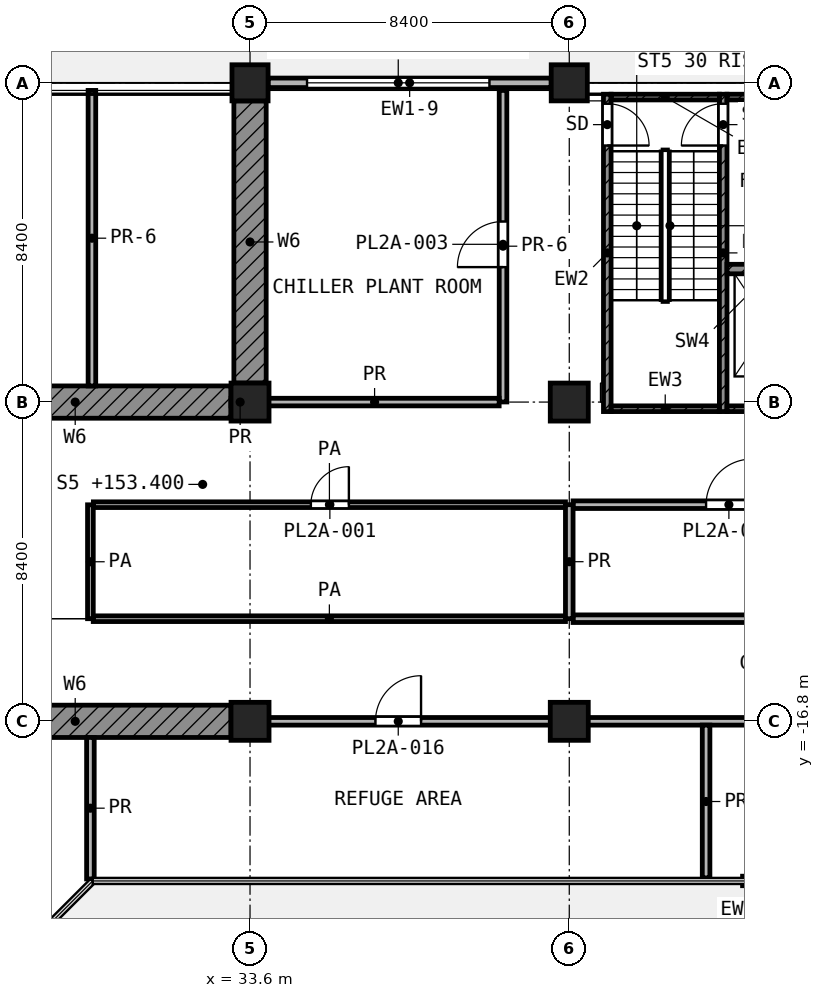
"""IFC4 building model, lengths in metres.
Left out: names, types, materials, properties, quantities, classifications, styles, units other than length and angle.
Written with IfcOpenShell. Run it as: python <this file> out.ifc"""

import sys

from ifc_helpers import new_model, si_unit, direction, frame, frame_2d, origin, origin_2d, place, context, subcontext, project, spatial, rectangle, extrude, element, fill, save


model = new_model("IFC4")
c1 = context("Model", 3, precision=1e-05, world=origin(), true_north=direction((0.0, 1.0)))
c2 = subcontext(c1, "Body", "Model", "MODEL_VIEW")
j1 = project(units=[si_unit("LENGTHUNIT", "METRE"), si_unit("PLANEANGLEUNIT", "RADIAN")], contexts=[c1])
p1 = place(None, origin())
s1 = spatial("IfcSite", under=j1, at=p1, CompositionType="ELEMENT")
p2 = place(p1, origin())
s2 = spatial("IfcBuilding", under=s1, at=p2, CompositionType="ELEMENT")
p3 = place(p2, frame((0.0, 0.0, 153.4)))
s3 = spatial("IfcBuildingStorey", under=s2, at=p3, CompositionType="ELEMENT", Elevation=153.4)
for number, where, z_axis, x_axis in (
    (1, (33.6, 0.0, 0.0), (0.0, 0.0, 1.0), (1.0, 0.0, 0.0)),
    (2, (42.0, 0.0, 0.0), (0.0, 0.0, 1.0), (1.0, 0.0, 0.0)),
):
    element("IfcColumn", number, at=place(p3, frame(where, z_axis=z_axis, x_axis=x_axis)), inside=s3, PredefinedType="COLUMN", context=c2, shape_type="SweptSolid", body=[
        extrude(rectangle(XDim=0.95, YDim=0.95, at=origin_2d()), origin(), (0.0, 0.0, 1.0), 5.0),
    ])
p4 = place(p3, frame((33.6, -8.4, 0.0), z_axis=(0.0, 0.0, 1.0), x_axis=(1.0, 0.0, 0.0)))
e3 = element("IfcColumn", 3, at=p4, inside=s3, PredefinedType="COLUMN", context=c2, shape_type="SweptSolid", body=[
    extrude(rectangle(XDim=1.0, YDim=1.0, at=origin_2d()), origin(), (0.0, 0.0, 1.0), 5.0),
])
for number, where, z_axis, x_axis in (
    (4, (42.0, -8.4, 0.0), (0.0, 0.0, 1.0), (1.0, 0.0, 0.0)),
    (5, (33.6, -16.8, 0.0), (0.0, 0.0, 1.0), (1.0, 0.0, 0.0)),
    (6, (42.0, -16.8, 0.0), (0.0, 0.0, 1.0), (1.0, 0.0, 0.0)),
):
    element("IfcColumn", number, at=place(p3, frame(where, z_axis=z_axis, x_axis=x_axis)), inside=s3, PredefinedType="COLUMN", context=c2, shape_type="SweptSolid", body=[
        extrude(rectangle(XDim=1.0, YDim=1.0, at=origin_2d()), origin(), (0.0, 0.0, 1.0), 5.0),
    ])
for number, where, z_axis, x_axis in (
    (7, (24.9, -8.4, 0.0), (0.0, 0.0, 1.0), (1.0, 0.0, 0.0)),
    (8, (24.9, -16.8, 0.0), (0.0, 0.0, 1.0), (1.0, 0.0, 0.0)),
):
    element("IfcWall", number, at=place(p3, frame(where, z_axis=z_axis, x_axis=x_axis)), inside=s3, PredefinedType="SHEAR", context=c2, shape_type="SweptSolid", body=[
        extrude(rectangle(XDim=8.2, YDim=0.85, at=frame_2d((4.1, 0.0))), origin(), (0.0, 0.0, 1.0), 4.4),
    ])
p5 = place(p3, frame((33.6, -0.475, 0.0), z_axis=(0.0, 0.0, 1.0), x_axis=(0.0, -1.0, 0.0)))
e9 = element("IfcWall", 9, at=p5, inside=s3, PredefinedType="SHEAR", context=c2, shape_type="SweptSolid", body=[
    extrude(rectangle(XDim=7.425, YDim=0.85, at=frame_2d((3.712, 0.0))), origin(), (0.0, 0.0, 1.0), 4.4),
])
p6 = place(p3, frame((46.56, -21.0, 0.0), z_axis=(0.0, 0.0, 1.0), x_axis=(1.0, 0.0, 0.0)))
e10 = element("IfcWall", 10, at=p6, inside=s3, PredefinedType="SOLIDWALL", context=c2, shape_type="SweptSolid", body=[
    extrude(rectangle(XDim=4.2, YDim=0.25, at=frame_2d((2.1, 0.0))), origin(), (0.0, 0.0, 1.0), 4.24),
])
p7 = place(p6, frame((1.2, 0.0, 0.0)))
e11 = element("IfcOpeningElement", 11, at=p7, cuts=e10, PredefinedType="OPENING", context=c2, shape_type="SweptSolid", body=[
    extrude(rectangle(XDim=1.8, YDim=2.1, at=frame_2d((0.9, 1.05))), frame((0.0, 0.135, 0.0), z_axis=(0.0, -1.0, 0.0), x_axis=(1.0, 0.0, 0.0)), (0.0, 0.0, 1.0), 0.27),
])
p8 = place(p3, frame((41.525, 0.0, 0.0), z_axis=(0.0, 0.0, 1.0), x_axis=(-1.0, 0.0, 0.0)))
e12 = element("IfcWall", 12, at=p8, inside=s3, PredefinedType="SOLIDWALL", context=c2, shape_type="SweptSolid", body=[
    extrude(rectangle(XDim=7.45, YDim=0.25, at=frame_2d((3.725, 0.0))), origin(), (0.0, 0.0, 1.0), 3.1),
])
p9 = place(p8, frame((1.625, 0.0, 0.6)))
e13 = element("IfcOpeningElement", 13, at=p9, cuts=e12, PredefinedType="OPENING", context=c2, shape_type="SweptSolid", body=[
    extrude(rectangle(XDim=4.8, YDim=2.2, at=frame_2d((2.4, 1.1))), frame((0.0, 0.135, 0.0), z_axis=(0.0, -1.0, 0.0), x_axis=(1.0, 0.0, 0.0)), (0.0, 0.0, 1.0), 0.27),
])
p10 = place(p3, frame((43.0, -8.65, 0.0), z_axis=(0.0, 0.0, 1.0), x_axis=(0.0, 1.0, 0.0)))
e14 = element("IfcWall", 14, at=p10, inside=s3, PredefinedType="SHEAR", context=c2, shape_type="SweptSolid", body=[
    extrude(rectangle(XDim=8.35, YDim=0.2, at=frame_2d((4.175, 0.0))), origin(), (0.0, 0.0, 1.0), 4.4),
])
p11 = place(p10, frame((7.0, 0.0, 0.0)))
e15 = element("IfcOpeningElement", 15, at=p11, cuts=e14, PredefinedType="OPENING", context=c2, shape_type="SweptSolid", body=[
    extrude(rectangle(XDim=1.1, YDim=2.1, at=frame_2d((0.55, 1.05))), frame((0.0, 0.11, 0.0), z_axis=(0.0, -1.0, 0.0), x_axis=(1.0, 0.0, 0.0)), (0.0, 0.0, 1.0), 0.22),
])
p12 = place(p3, frame((46.05, -8.65, 0.0), z_axis=(0.0, 0.0, 1.0), x_axis=(0.0, 1.0, 0.0)))
e16 = element("IfcWall", 16, at=p12, inside=s3, PredefinedType="SHEAR", context=c2, shape_type="SweptSolid", body=[
    extrude(rectangle(XDim=8.35, YDim=0.2, at=frame_2d((4.175, 0.0))), origin(), (0.0, 0.0, 1.0), 4.4),
])
p13 = place(p12, frame((7.0, 0.0, 0.0)))
e17 = element("IfcOpeningElement", 17, at=p13, cuts=e16, PredefinedType="OPENING", context=c2, shape_type="SweptSolid", body=[
    extrude(rectangle(XDim=1.1, YDim=2.1, at=frame_2d((0.55, 1.05))), frame((0.0, 0.11, 0.0), z_axis=(0.0, -1.0, 0.0), x_axis=(1.0, 0.0, 0.0)), (0.0, 0.0, 1.0), 0.22),
])
p14 = place(p3, frame((43.1, -0.375, 0.0), z_axis=(0.0, 0.0, 1.0), x_axis=(1.0, 0.0, 0.0)))
e18 = element("IfcWall", 18, at=p14, inside=s3, PredefinedType="SHEAR", context=c2, shape_type="SweptSolid", body=[
    extrude(rectangle(XDim=2.85, YDim=0.15, at=frame_2d((1.425, 0.0))), origin(), (0.0, 0.0, 1.0), 4.4),
])
p15 = place(p3, frame((46.15, -0.375, 0.0), z_axis=(0.0, 0.0, 1.0), x_axis=(1.0, 0.0, 0.0)))
e19 = element("IfcWall", 19, at=p15, inside=s3, PredefinedType="SHEAR", context=c2, shape_type="SweptSolid", body=[
    extrude(rectangle(XDim=2.45, YDim=0.15, at=frame_2d((1.225, 0.0))), origin(), (0.0, 0.0, 1.0), 4.4),
])
p16 = place(p3, frame((43.1, -8.575, 0.0), z_axis=(0.0, 0.0, 1.0), x_axis=(1.0, 0.0, 0.0)))
e20 = element("IfcWall", 20, at=p16, inside=s3, PredefinedType="SHEAR", context=c2, shape_type="SweptSolid", body=[
    extrude(rectangle(XDim=2.85, YDim=0.15, at=frame_2d((1.425, 0.0))), origin(), (0.0, 0.0, 1.0), 4.4),
])
p17 = place(p3, frame((46.15, -8.575, 0.0), z_axis=(0.0, 0.0, 1.0), x_axis=(1.0, 0.0, 0.0)))
e21 = element("IfcWall", 21, at=p17, inside=s3, PredefinedType="SHEAR", context=c2, shape_type="SweptSolid", body=[
    extrude(rectangle(XDim=2.45, YDim=0.15, at=frame_2d((1.225, 0.0))), origin(), (0.0, 0.0, 1.0), 4.4),
])
p18 = place(p3, frame((46.15, -4.9, 0.0), z_axis=(0.0, 0.0, 1.0), x_axis=(1.0, 0.0, 0.0)))
e22 = element("IfcWall", 22, at=p18, inside=s3, PredefinedType="SHEAR", context=c2, shape_type="SweptSolid", body=[
    extrude(rectangle(XDim=2.45, YDim=0.25, at=frame_2d((1.225, 0.0))), origin(), (0.0, 0.0, 1.0), 4.4),
])
p19 = place(p18, frame((0.6, 0.0, 0.0)))
e23 = element("IfcOpeningElement", 23, at=p19, cuts=e22, PredefinedType="OPENING", context=c2, shape_type="SweptSolid", body=[
    extrude(rectangle(XDim=1.3, YDim=2.1, at=frame_2d((0.65, 1.05))), frame((0.0, 0.135, 0.0), z_axis=(0.0, -1.0, 0.0), x_axis=(1.0, 0.0, 0.0)), (0.0, 0.0, 1.0), 0.27),
])
p20 = place(p3, frame((29.475, -14.1, 0.0), z_axis=(0.0, 0.0, 1.0), x_axis=(1.0, 0.0, 0.0)))
e24 = element("IfcWall", 24, at=p20, inside=s3, PredefinedType="PARTITIONING", context=c2, shape_type="SweptSolid", body=[
    extrude(rectangle(XDim=12.425, YDim=0.15, at=frame_2d((6.212, 0.0))), origin(), (0.0, 0.0, 1.0), 4.4),
])
p21 = place(p3, frame((29.478, -11.1, 0.0), z_axis=(0.0, 0.0, 1.0), x_axis=(1.0, 0.0, 0.0)))
e25 = element("IfcWall", 25, at=p21, inside=s3, PredefinedType="PARTITIONING", context=c2, shape_type="SweptSolid", body=[
    extrude(rectangle(XDim=12.422, YDim=0.15, at=frame_2d((6.211, 0.0))), origin(), (0.0, 0.0, 1.0), 4.4),
])
p22 = place(p21, frame((5.723, 0.0, 0.0)))
e26 = element("IfcOpeningElement", 26, at=p22, cuts=e25, PredefinedType="OPENING", context=c2, shape_type="SweptSolid", body=[
    extrude(rectangle(XDim=1.0, YDim=2.1, at=frame_2d((0.5, 1.05))), frame((0.0, 0.085, 0.0), z_axis=(0.0, -1.0, 0.0), x_axis=(1.0, 0.0, 0.0)), (0.0, 0.0, 1.0), 0.17),
])
p23 = place(p3, frame((29.4, -14.1, 0.0), z_axis=(0.0, 0.0, 1.0), x_axis=(0.0, 1.0, 0.0)))
e27 = element("IfcWall", 27, at=p23, inside=s3, PredefinedType="PARTITIONING", context=c2, shape_type="SweptSolid", body=[
    extrude(rectangle(XDim=2.997, YDim=0.15, at=frame_2d((1.499, 0.0))), origin(), (0.0, 0.0, 1.0), 4.4),
])
p24 = place(p3, frame((33.1, -16.8, 0.0), z_axis=(0.0, 0.0, 1.0), x_axis=(1.0, 0.0, 0.0)))
e28 = element("IfcWall", 28, at=p24, inside=s3, PredefinedType="PARTITIONING", context=c2, shape_type="SweptSolid", body=[
    extrude(rectangle(XDim=38.221, YDim=0.2, at=frame_2d((19.11, 0.0))), origin(), (0.0, 0.0, 1.0), 4.4),
])
p25 = place(p24, frame((3.8, 0.0, 0.0)))
e29 = element("IfcOpeningElement", 29, at=p25, cuts=e28, PredefinedType="OPENING", context=c2, shape_type="SweptSolid", body=[
    extrude(rectangle(XDim=1.2, YDim=2.1, at=frame_2d((0.6, 1.05))), frame((0.0, 0.11, 0.0), z_axis=(0.0, -1.0, 0.0), x_axis=(1.0, 0.0, 0.0)), (0.0, 0.0, 1.0), 0.22),
])
p26 = place(p24, frame((15.5, 0.0, 0.0)))
e30 = element("IfcOpeningElement", 30, at=p26, cuts=e28, PredefinedType="OPENING", context=c2, shape_type="SweptSolid", body=[
    extrude(rectangle(XDim=1.2, YDim=2.1, at=frame_2d((0.6, 1.05))), frame((0.0, 0.11, 0.0), z_axis=(0.0, -1.0, 0.0), x_axis=(1.0, 0.0, 0.0)), (0.0, 0.0, 1.0), 0.22),
])
p27 = place(p24, frame((26.3, 0.0, 0.0)))
e31 = element("IfcOpeningElement", 31, at=p27, cuts=e28, PredefinedType="OPENING", context=c2, shape_type="SweptSolid", body=[
    extrude(rectangle(XDim=1.2, YDim=2.1, at=frame_2d((0.6, 1.05))), frame((0.0, 0.11, 0.0), z_axis=(0.0, -1.0, 0.0), x_axis=(1.0, 0.0, 0.0)), (0.0, 0.0, 1.0), 0.22),
])
p28 = place(p24, frame((34.701, 0.0, 0.0)))
e32 = element("IfcOpeningElement", 32, at=p28, cuts=e28, PredefinedType="OPENING", context=c2, shape_type="SweptSolid", body=[
    extrude(rectangle(XDim=1.2, YDim=2.1, at=frame_2d((0.6, 1.05))), frame((0.0, 0.11, 0.0), z_axis=(0.0, -1.0, 0.0), x_axis=(1.0, 0.0, 0.0)), (0.0, 0.0, 1.0), 0.22),
])
p29 = place(p3, frame((42.1, -14.1, 0.0), z_axis=(0.0, 0.0, 1.0), x_axis=(1.0, 0.0, 0.0)))
e33 = element("IfcWall", 33, at=p29, inside=s3, PredefinedType="PARTITIONING", context=c2, shape_type="SweptSolid", body=[
    extrude(rectangle(XDim=26.5, YDim=0.2, at=frame_2d((13.25, 0.0))), origin(), (0.0, 0.0, 1.0), 4.4),
])
p30 = place(p3, frame((42.1, -11.1, 0.0), z_axis=(0.0, 0.0, 1.0), x_axis=(1.0, 0.0, 0.0)))
e34 = element("IfcWall", 34, at=p30, inside=s3, PredefinedType="PARTITIONING", context=c2, shape_type="SweptSolid", body=[
    extrude(rectangle(XDim=26.497, YDim=0.2, at=frame_2d((13.249, 0.0))), origin(), (0.0, 0.0, 1.0), 4.4),
])
p31 = place(p30, frame((3.5, 0.0, 0.0)))
e35 = element("IfcOpeningElement", 35, at=p31, cuts=e34, PredefinedType="OPENING", context=c2, shape_type="SweptSolid", body=[
    extrude(rectangle(XDim=1.2, YDim=2.1, at=frame_2d((0.6, 1.05))), frame((0.0, 0.11, 0.0), z_axis=(0.0, -1.0, 0.0), x_axis=(1.0, 0.0, 0.0)), (0.0, 0.0, 1.0), 0.22),
])
p32 = place(p30, frame((11.9, 0.0, 0.0)))
e36 = element("IfcOpeningElement", 36, at=p32, cuts=e34, PredefinedType="OPENING", context=c2, shape_type="SweptSolid", body=[
    extrude(rectangle(XDim=1.2, YDim=2.1, at=frame_2d((0.6, 1.05))), frame((0.0, 0.11, 0.0), z_axis=(0.0, -1.0, 0.0), x_axis=(1.0, 0.0, 0.0)), (0.0, 0.0, 1.0), 0.22),
])
p33 = place(p30, frame((21.048, 0.0, 0.0)))
e37 = element("IfcOpeningElement", 37, at=p33, cuts=e34, PredefinedType="OPENING", context=c2, shape_type="SweptSolid", body=[
    extrude(rectangle(XDim=1.2, YDim=2.1, at=frame_2d((0.6, 1.05))), frame((0.0, 0.11, 0.0), z_axis=(0.0, -1.0, 0.0), x_axis=(1.0, 0.0, 0.0)), (0.0, 0.0, 1.0), 0.22),
])
p34 = place(p3, frame((33.1, -8.4, 0.0), z_axis=(0.0, 0.0, 1.0), x_axis=(1.0, 0.0, 0.0)))
e38 = element("IfcWall", 38, at=p34, inside=s3, PredefinedType="PARTITIONING", context=c2, shape_type="SweptSolid", body=[
    extrude(rectangle(XDim=0.48, YDim=0.2, at=frame_2d((0.24, 0.0))), origin(), (0.0, 0.0, 1.0), 4.4),
])
e39 = element("IfcWall", 39, at=p4, inside=s3, PredefinedType="PARTITIONING", context=c2, shape_type="SweptSolid", body=[
    extrude(rectangle(XDim=6.555, YDim=0.2, at=frame_2d((3.277, 0.0))), origin(), (0.0, 0.0, 1.0), 4.4),
])
p35 = place(p3, frame((29.4, -20.947, 0.0), z_axis=(0.0, 0.0, 1.0), x_axis=(0.0, 1.0, 0.0)))
e40 = element("IfcWall", 40, at=p35, inside=s3, PredefinedType="PARTITIONING", context=c2, shape_type="SweptSolid", body=[
    extrude(rectangle(XDim=3.723, YDim=0.2, at=frame_2d((1.861, 0.0))), origin(), (0.0, 0.0, 1.0), 4.4),
])
p36 = place(p3, frame((29.44, -7.976, 0.0), z_axis=(0.0, 0.0, 1.0), x_axis=(0.0, 1.0, 0.0)))
e41 = element("IfcWall", 41, at=p36, inside=s3, PredefinedType="PARTITIONING", context=c2, shape_type="SweptSolid", body=[
    extrude(rectangle(XDim=7.776, YDim=0.2, at=frame_2d((3.888, 0.0))), origin(), (0.0, 0.0, 1.0), 3.1),
])
p37 = place(p3, frame((40.257, -8.397, 0.0), z_axis=(0.0, 0.0, 1.0), x_axis=(0.0, 1.0, 0.0)))
e42 = element("IfcWall", 42, at=p37, inside=s3, PredefinedType="PARTITIONING", context=c2, shape_type="SweptSolid", body=[
    extrude(rectangle(XDim=8.197, YDim=0.2, at=frame_2d((4.099, 0.0))), origin(), (0.0, 0.0, 1.0), 3.1),
])
p38 = place(p37, frame((3.548, 0.0, 0.0)))
e43 = element("IfcOpeningElement", 43, at=p38, cuts=e42, PredefinedType="OPENING", context=c2, shape_type="SweptSolid", body=[
    extrude(rectangle(XDim=1.2, YDim=2.1, at=frame_2d((0.6, 1.05))), frame((0.0, 0.11, 0.0), z_axis=(0.0, -1.0, 0.0), x_axis=(1.0, 0.0, 0.0)), (0.0, 0.0, 1.0), 0.22),
])
p39 = place(p3, frame((42.0, -14.1, 0.0), z_axis=(0.0, 0.0, 1.0), x_axis=(0.0, 1.0, 0.0)))
e44 = element("IfcWall", 44, at=p39, inside=s3, PredefinedType="PARTITIONING", context=c2, shape_type="SweptSolid", body=[
    extrude(rectangle(XDim=3.0, YDim=0.2, at=frame_2d((1.5, 0.0))), origin(), (0.0, 0.0, 1.0), 4.4),
])
p40 = place(p3, frame((45.6, -20.92, 0.0), z_axis=(0.0, 0.0, 1.0), x_axis=(0.0, 1.0, 0.0)))
e45 = element("IfcWall", 45, at=p40, inside=s3, PredefinedType="PARTITIONING", context=c2, shape_type="SweptSolid", body=[
    extrude(rectangle(XDim=4.02, YDim=0.2, at=frame_2d((2.01, 0.0))), origin(), (0.0, 0.0, 1.0), 4.4),
])
p41 = place(p9, origin())
e46 = element("IfcWindow", 46, at=p41, inside=s3, PartitioningType="SINGLE_PANEL", PredefinedType="WINDOW", context=c2, shape_type="SweptSolid", body=[
    extrude(rectangle(XDim=4.8, YDim=2.2, at=frame_2d((2.4, 1.1))), frame((0.0, 0.03, 0.0), z_axis=(0.0, -1.0, 0.0), x_axis=(1.0, 0.0, 0.0)), (0.0, 0.0, 1.0), 0.06),
])
fill(e13, e46)
p42 = place(p11, frame((1.1, 0.0, 0.0), z_axis=(0.0, 0.0, 1.0), x_axis=(-1.0, 0.0, 0.0)))
e47 = element("IfcDoor", 47, at=p42, inside=s3, OperationType="SINGLE_SWING_LEFT", PredefinedType="DOOR", context=c2, shape_type="SweptSolid", body=[
    extrude(rectangle(XDim=1.1, YDim=2.1, at=frame_2d((0.55, 1.05))), frame((0.0, 0.025, 0.0), z_axis=(0.0, -1.0, 0.0), x_axis=(1.0, 0.0, 0.0)), (0.0, 0.0, 1.0), 0.05),
])
fill(e15, e47)
p43 = place(p13, origin())
e48 = element("IfcDoor", 48, at=p43, inside=s3, OperationType="SINGLE_SWING_LEFT", PredefinedType="DOOR", context=c2, shape_type="SweptSolid", body=[
    extrude(rectangle(XDim=1.1, YDim=2.1, at=frame_2d((0.55, 1.05))), frame((0.0, 0.025, 0.0), z_axis=(0.0, -1.0, 0.0), x_axis=(1.0, 0.0, 0.0)), (0.0, 0.0, 1.0), 0.05),
])
fill(e17, e48)
p44 = place(p38, origin())
e49 = element("IfcDoor", 49, at=p44, inside=s3, OperationType="SINGLE_SWING_LEFT", PredefinedType="DOOR", context=c2, shape_type="SweptSolid", body=[
    extrude(rectangle(XDim=1.2, YDim=2.1, at=frame_2d((0.6, 1.05))), frame((0.0, 0.025, 0.0), z_axis=(0.0, -1.0, 0.0), x_axis=(1.0, 0.0, 0.0)), (0.0, 0.0, 1.0), 0.05),
])
fill(e43, e49)
p45 = place(p22, origin())
e50 = element("IfcDoor", 50, at=p45, inside=s3, OperationType="SINGLE_SWING_RIGHT", PredefinedType="DOOR", context=c2, shape_type="SweptSolid", body=[
    extrude(rectangle(XDim=1.0, YDim=2.1, at=frame_2d((0.5, 1.05))), frame((0.0, 0.025, 0.0), z_axis=(0.0, -1.0, 0.0), x_axis=(1.0, 0.0, 0.0)), (0.0, 0.0, 1.0), 0.05),
])
fill(e26, e50)
p46 = place(p31, origin())
e51 = element("IfcDoor", 51, at=p46, inside=s3, OperationType="SINGLE_SWING_RIGHT", PredefinedType="DOOR", context=c2, shape_type="SweptSolid", body=[
    extrude(rectangle(XDim=1.2, YDim=2.1, at=frame_2d((0.6, 1.05))), frame((0.0, 0.025, 0.0), z_axis=(0.0, -1.0, 0.0), x_axis=(1.0, 0.0, 0.0)), (0.0, 0.0, 1.0), 0.05),
])
fill(e35, e51)
p47 = place(p25, origin())
e52 = element("IfcDoor", 52, at=p47, inside=s3, OperationType="SINGLE_SWING_RIGHT", PredefinedType="DOOR", context=c2, shape_type="SweptSolid", body=[
    extrude(rectangle(XDim=1.2, YDim=2.1, at=frame_2d((0.6, 1.05))), frame((0.0, 0.025, 0.0), z_axis=(0.0, -1.0, 0.0), x_axis=(1.0, 0.0, 0.0)), (0.0, 0.0, 1.0), 0.05),
])
fill(e29, e52)
save(model, sys.argv[1])
